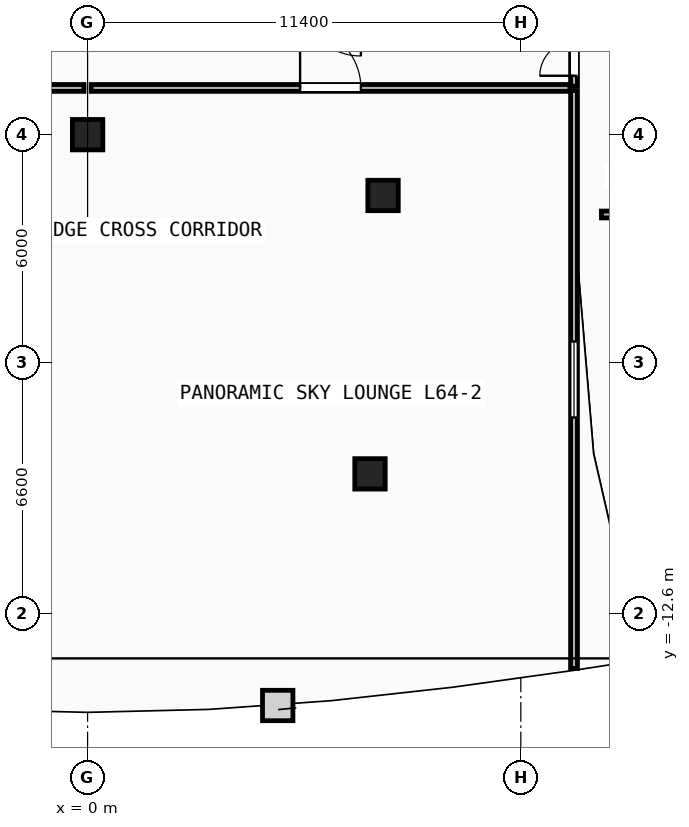
"""IFC4 building model, lengths in metres.
Left out: names, types, materials, properties, quantities, classifications, styles, units other than length and angle.
Written with IfcOpenShell. Run it as: python <this file> out.ifc"""

import sys

from ifc_helpers import new_model, si_unit, direction, frame, frame_2d, origin, origin_2d, place, context, subcontext, project, spatial, rectangle, extrude, element, fill, save


model = new_model("IFC4")
c1 = context("Model", 3, precision=1e-05, world=origin(), true_north=direction((0.0, 1.0)))
c2 = subcontext(c1, "Body", "Model", "MODEL_VIEW")
j1 = project(units=[si_unit("LENGTHUNIT", "METRE"), si_unit("PLANEANGLEUNIT", "RADIAN")], contexts=[c1])
p1 = place(None, origin())
s1 = spatial("IfcSite", under=j1, at=p1, CompositionType="ELEMENT")
p2 = place(p1, origin())
s2 = spatial("IfcBuilding", under=s1, at=p2, CompositionType="ELEMENT")
p3 = place(p2, frame((0.0, 0.0, 243.2)))
s3 = spatial("IfcBuildingStorey", under=s2, at=p3, CompositionType="ELEMENT", Elevation=243.2)
for number, where, z_axis, x_axis in (
    (1, (7.431, -8.925, 0.0), (0.0, 0.0, 1.0), (1.0, 0.0, 0.0)),
    (2, (0.0, 0.0, 0.0), (0.0, 0.0, 1.0), (1.0, 0.0, 0.0)),
    (3, (7.775, -1.6, 0.0), (0.0, 0.0, 1.0), (1.0, 0.0, 0.0)),
):
    element("IfcColumn", number, at=place(p3, frame(where, z_axis=z_axis, x_axis=x_axis)), inside=s3, PredefinedType="COLUMN", context=c2, shape_type="SweptSolid", body=[
        extrude(rectangle(XDim=0.8, YDim=0.8, at=origin_2d()), origin(), (0.0, 0.0, 1.0), 3.6),
    ])
p4 = place(p3, frame((13.521, -2.1, 0.0), z_axis=(0.0, 0.0, 1.0), x_axis=(1.0, 0.0, 0.0)))
e4 = element("IfcWall", 4, at=p4, inside=s3, PredefinedType="PARTITIONING", context=c2, shape_type="SweptSolid", body=[
    extrude(rectangle(XDim=7.398, YDim=0.18, at=frame_2d((3.699, 0.0))), origin(), (0.0, 0.0, 1.0), 3.34),
])
p5 = place(p3, frame((-12.688, 1.23, 0.0), z_axis=(0.0, 0.0, 1.0), x_axis=(1.0, 0.0, 0.0)))
e5 = element("IfcWall", 5, at=p5, inside=s3, PredefinedType="PARTITIONING", context=c2, shape_type="SweptSolid", body=[
    extrude(rectangle(XDim=12.594, YDim=0.18, at=frame_2d((6.297, 0.0))), origin(), (0.0, 0.0, 1.0), 2.663),
])
p6 = place(p5, frame((5.497, 0.0, 0.0)))
e6 = element("IfcOpeningElement", 6, at=p6, cuts=e5, PredefinedType="OPENING", context=c2, shape_type="SweptSolid", body=[
    extrude(rectangle(XDim=1.6, YDim=2.2, at=frame_2d((0.8, 1.1))), frame((0.0, 0.1, 0.0), z_axis=(0.0, -1.0, 0.0), x_axis=(1.0, 0.0, 0.0)), (0.0, 0.0, 1.0), 0.2),
])
p7 = place(p3, frame((0.095, 1.23, 0.0), z_axis=(0.0, 0.0, 1.0), x_axis=(1.0, 0.0, 0.0)))
e7 = element("IfcWall", 7, at=p7, inside=s3, PredefinedType="PARTITIONING", context=c2, shape_type="SweptSolid", body=[
    extrude(rectangle(XDim=12.594, YDim=0.18, at=frame_2d((6.297, 0.0))), origin(), (0.0, 0.0, 1.0), 3.34),
])
p8 = place(p7, frame((5.497, 0.0, 0.0)))
e8 = element("IfcOpeningElement", 8, at=p8, cuts=e7, PredefinedType="OPENING", context=c2, shape_type="SweptSolid", body=[
    extrude(rectangle(XDim=1.6, YDim=2.2, at=frame_2d((0.8, 1.1))), frame((0.0, 0.1, 0.0), z_axis=(0.0, -1.0, 0.0), x_axis=(1.0, 0.0, 0.0)), (0.0, 0.0, 1.0), 0.2),
])
p9 = place(p3, frame((12.8, -14.044, 0.0), z_axis=(0.0, 0.0, 1.0), x_axis=(0.0, 1.0, 0.0)))
e9 = element("IfcWall", 9, at=p9, inside=s3, PredefinedType="PARTITIONING", context=c2, shape_type="SweptSolid", body=[
    extrude(rectangle(XDim=15.204, YDim=0.18, at=frame_2d((7.602, 0.0))), origin(), (0.0, 0.0, 1.0), 3.34),
])
p10 = place(p9, frame((6.602, 0.0, 1.05)))
e10 = element("IfcOpeningElement", 10, at=p10, cuts=e9, PredefinedType="OPENING", context=c2, shape_type="SweptSolid", body=[
    extrude(rectangle(XDim=2.0, YDim=1.5, at=frame_2d((1.0, 0.75))), frame((0.0, 0.1, 0.0), z_axis=(0.0, -1.0, 0.0), x_axis=(1.0, 0.0, 0.0)), (0.0, 0.0, 1.0), 0.2),
])
p11 = place(p3, frame((12.8, 1.28, 0.0), z_axis=(0.0, 0.0, 1.0), x_axis=(0.0, 1.0, 0.0)))
e11 = element("IfcWall", 11, at=p11, inside=s3, PredefinedType="PARTITIONING", context=c2, shape_type="SweptSolid", body=[
    extrude(rectangle(XDim=2.34, YDim=0.18, at=frame_2d((1.17, 0.0))), origin(), (0.0, 0.0, 1.0), 3.34),
])
p12 = place(p11, frame((0.27, 0.0, 0.0)))
e12 = element("IfcOpeningElement", 12, at=p12, cuts=e11, PredefinedType="OPENING", context=c2, shape_type="SweptSolid", body=[
    extrude(rectangle(XDim=1.8, YDim=2.25, at=frame_2d((0.9, 1.125))), frame((0.0, 0.1, 0.0), z_axis=(0.0, -1.0, 0.0), x_axis=(1.0, 0.0, 0.0)), (0.0, 0.0, 1.0), 0.2),
])
p13 = place(p8, origin())
e13 = element("IfcDoor", 13, at=p13, inside=s3, OperationType="SINGLE_SWING_LEFT", PredefinedType="DOOR", context=c2, shape_type="SweptSolid", body=[
    extrude(rectangle(XDim=1.6, YDim=2.2, at=frame_2d((0.8, 1.1))), frame((0.0, 0.025, 0.0), z_axis=(0.0, -1.0, 0.0), x_axis=(1.0, 0.0, 0.0)), (0.0, 0.0, 1.0), 0.05),
])
fill(e8, e13)
p14 = place(p12, origin())
e14 = element("IfcDoor", 14, at=p14, inside=s3, OperationType="DOUBLE_DOOR_SINGLE_SWING", PredefinedType="DOOR", context=c2, shape_type="SweptSolid", body=[
    extrude(rectangle(XDim=1.8, YDim=2.25, at=frame_2d((0.9, 1.125))), frame((0.0, 0.025, 0.0), z_axis=(0.0, -1.0, 0.0), x_axis=(1.0, 0.0, 0.0)), (0.0, 0.0, 1.0), 0.05),
])
fill(e12, e14)
p15 = place(p10, origin())
e15 = element("IfcWindow", 15, at=p15, inside=s3, PartitioningType="SINGLE_PANEL", PredefinedType="WINDOW", context=c2, shape_type="SweptSolid", body=[
    extrude(rectangle(XDim=2.0, YDim=1.5, at=frame_2d((1.0, 0.75))), frame((0.0, 0.03, 0.0), z_axis=(0.0, -1.0, 0.0), x_axis=(1.0, 0.0, 0.0)), (0.0, 0.0, 1.0), 0.06),
])
fill(e10, e15)
save(model, sys.argv[1])
